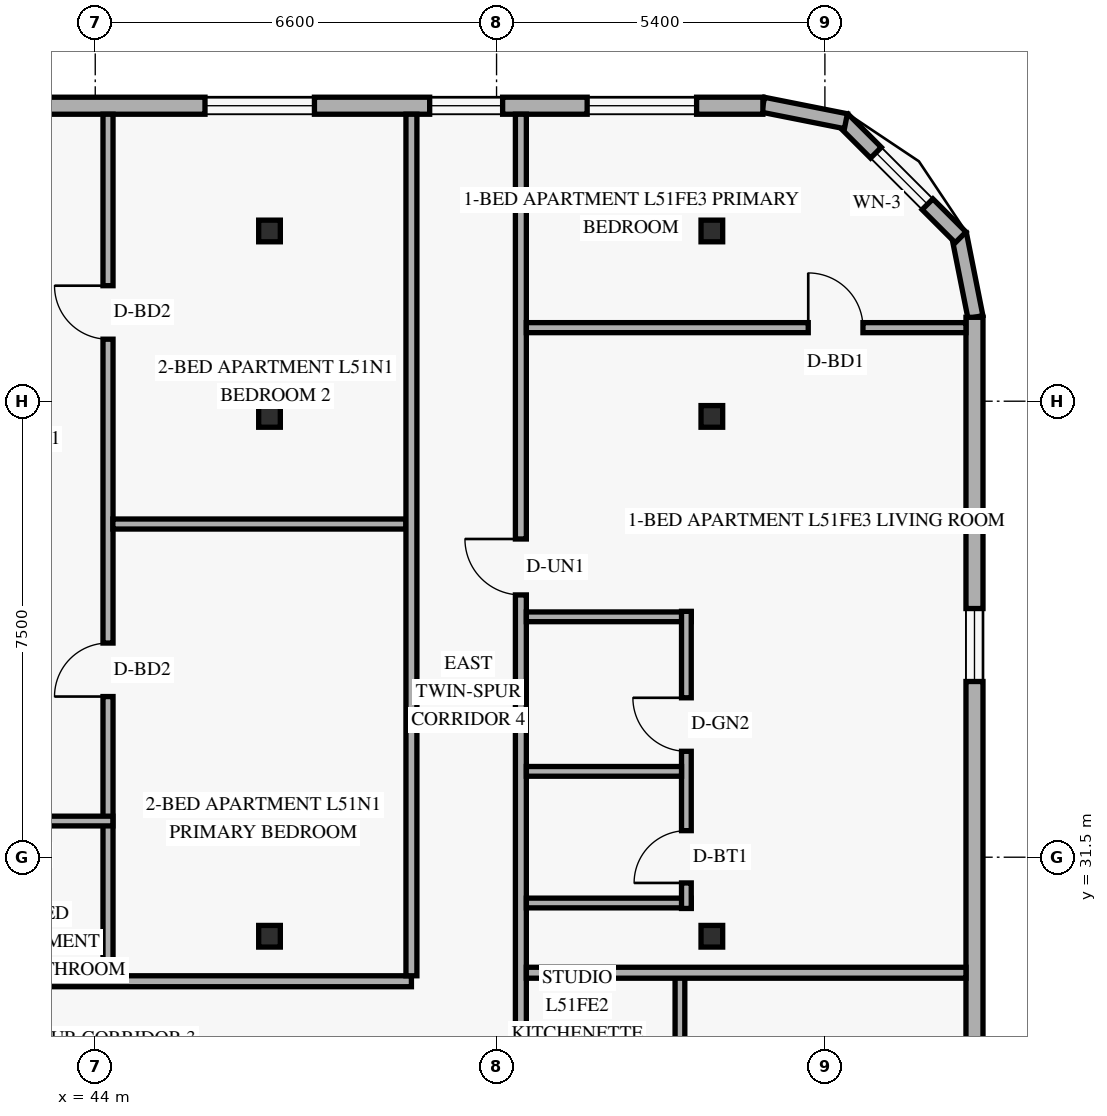
"""IFC4 building model, lengths in metres.
Left out: names, types, materials, properties, quantities, classifications, styles, units other than length and angle.
Written with IfcOpenShell. Run it as: python <this file> out.ifc"""

import sys

from ifc_helpers import new_model, si_unit, direction, frame, frame_2d, origin, origin_2d, place, context, subcontext, project, spatial, rectangle, hollow_rectangle, extrude, element, fill, save


model = new_model("IFC4")
c1 = context("Model", 3, precision=1e-05, world=origin(), true_north=direction((0.0, 1.0)))
c2 = subcontext(c1, "Body", "Model", "MODEL_VIEW")
j1 = project(units=[si_unit("LENGTHUNIT", "METRE"), si_unit("PLANEANGLEUNIT", "RADIAN")], contexts=[c1])
p1 = place(None, origin())
s1 = spatial("IfcSite", under=j1, at=p1, CompositionType="ELEMENT")
p2 = place(p1, origin())
s2 = spatial("IfcBuilding", under=s1, at=p2, CompositionType="ELEMENT")
p3 = place(p2, frame((0.0, 0.0, 196.2)))
s3 = spatial("IfcBuildingStorey", under=s2, at=p3, CompositionType="ELEMENT", Elevation=196.2)
for number, where, z_axis, x_axis in (
    (1, (46.803, 30.2, 0.0), (0.035, 0.0, 0.999), (0.0, 1.0, 0.0)),
    (2, (46.803, 38.75, 0.0), (0.035, 0.0, 0.999), (0.0, 1.0, 0.0)),
    (3, (46.803, 41.8, 0.0), (0.035, 0.0, 0.999), (0.0, 1.0, 0.0)),
):
    element("IfcColumn", number, at=place(p3, frame(where, z_axis=z_axis, x_axis=x_axis)), inside=s3, PredefinedType="COLUMN", context=c2, shape_type="SweptSolid", body=[
        extrude(hollow_rectangle(XDim=0.356, YDim=0.356, WallThickness=0.016, at=origin_2d()), origin(), (0.0, 0.0, 1.0), 3.602),
    ])
for number, where, z_axis, x_axis in (
    (4, (54.036, 30.2, 0.0), (0.058, 0.0, 0.998), (0.0, 1.0, 0.0)),
    (5, (54.036, 38.75, 0.0), (0.058, 0.0, 0.998), (0.0, 1.0, 0.0)),
    (6, (54.036, 41.8, 0.0), (0.058, 0.0, 0.998), (0.0, 1.0, 0.0)),
):
    element("IfcColumn", number, at=place(p3, frame(where, z_axis=z_axis, x_axis=x_axis)), inside=s3, PredefinedType="COLUMN", context=c2, shape_type="SweptSolid", body=[
        extrude(hollow_rectangle(XDim=0.356, YDim=0.356, WallThickness=0.016, at=origin_2d()), origin(), (0.0, 0.0, 1.0), 3.606),
    ])
p4 = place(p3, frame((58.476, 40.384, 0.0), z_axis=(0.0, 0.0, 1.0), x_axis=(-0.19496651342, 0.980809899341, 0.0)))
e7 = element("IfcWall", 7, at=p4, inside=s3, PredefinedType="SOLIDWALL", context=c2, shape_type="SweptSolid", body=[
    extrude(rectangle(XDim=1.389, YDim=0.25, at=frame_2d((0.694, 0.0))), origin(), (0.0, 0.0, 1.0), 3.3),
])
p5 = place(p3, frame((58.232, 41.695, 0.0), z_axis=(0.0, 0.0, 1.0), x_axis=(-0.707106781187, 0.707106781187, 0.0)))
e8 = element("IfcWall", 8, at=p5, inside=s3, PredefinedType="SOLIDWALL", context=c2, shape_type="SweptSolid", body=[
    extrude(rectangle(XDim=2.739, YDim=0.25, at=frame_2d((1.37, 0.0))), origin(), (0.0, 0.0, 1.0), 3.3),
])
p6 = place(p5, frame((0.77, 0.0, 0.85)))
e9 = element("IfcOpeningElement", 9, at=p6, cuts=e8, PredefinedType="OPENING", context=c2, shape_type="SweptSolid", body=[
    extrude(rectangle(XDim=1.2, YDim=1.5, at=frame_2d((0.6, 0.75))), frame((0.0, 0.135, 0.0), z_axis=(0.0, -1.0, 0.0), x_axis=(1.0, 0.0, 0.0)), (0.0, 0.0, 1.0), 0.27),
])
p7 = place(p3, frame((56.345, 43.605, 0.0), z_axis=(0.0, 0.0, 1.0), x_axis=(-0.980809899341, 0.19496651342, 0.0)))
e10 = element("IfcWall", 10, at=p7, inside=s3, PredefinedType="SOLIDWALL", context=c2, shape_type="SweptSolid", body=[
    extrude(rectangle(XDim=1.389, YDim=0.25, at=frame_2d((0.694, 0.0))), origin(), (0.0, 0.0, 1.0), 3.3),
])
p8 = place(p3, frame((58.46, 7.62, 0.0), z_axis=(0.0, 0.0, 1.0), x_axis=(0.0, 1.0, 0.0)))
e11 = element("IfcWall", 11, at=p8, inside=s3, PredefinedType="SOLIDWALL", context=c2, shape_type="SweptSolid", body=[
    extrude(rectangle(XDim=32.76, YDim=0.28, at=frame_2d((16.38, 0.0))), origin(), (0.0, 0.0, 1.0), 3.3),
])
p9 = place(p8, frame((3.79, 0.0, 0.85)))
e12 = element("IfcOpeningElement", 12, at=p9, cuts=e11, PredefinedType="OPENING", context=c2, shape_type="SweptSolid", body=[
    extrude(rectangle(XDim=1.2, YDim=1.5, at=frame_2d((0.6, 0.75))), frame((0.0, 0.15, 0.0), z_axis=(0.0, -1.0, 0.0), x_axis=(1.0, 0.0, 0.0)), (0.0, 0.0, 1.0), 0.3),
])
p10 = place(p8, frame((14.78, 0.0, 0.85)))
e13 = element("IfcOpeningElement", 13, at=p10, cuts=e11, PredefinedType="OPENING", context=c2, shape_type="SweptSolid", body=[
    extrude(rectangle(XDim=1.2, YDim=1.5, at=frame_2d((0.6, 0.75))), frame((0.0, 0.15, 0.0), z_axis=(0.0, -1.0, 0.0), x_axis=(1.0, 0.0, 0.0)), (0.0, 0.0, 1.0), 0.3),
])
p11 = place(p8, frame((26.77, 0.0, 0.85)))
e14 = element("IfcOpeningElement", 14, at=p11, cuts=e11, PredefinedType="OPENING", context=c2, shape_type="SweptSolid", body=[
    extrude(rectangle(XDim=1.2, YDim=1.5, at=frame_2d((0.6, 0.75))), frame((0.0, 0.15, 0.0), z_axis=(0.0, -1.0, 0.0), x_axis=(1.0, 0.0, 0.0)), (0.0, 0.0, 1.0), 0.3),
])
p12 = place(p3, frame((54.98, 43.86, 0.0), z_axis=(0.0, 0.0, 1.0), x_axis=(-1.0, 0.0, 0.0)))
e15 = element("IfcWall", 15, at=p12, inside=s3, PredefinedType="SOLIDWALL", context=c2, shape_type="SweptSolid", body=[
    extrude(rectangle(XDim=33.76, YDim=0.28, at=frame_2d((16.88, 0.0))), origin(), (0.0, 0.0, 1.0), 3.3),
])
p13 = place(p12, frame((28.055, 0.0, 0.85)))
e16 = element("IfcOpeningElement", 16, at=p13, cuts=e15, PredefinedType="OPENING", context=c2, shape_type="SweptSolid", body=[
    extrude(rectangle(XDim=1.8, YDim=1.6, at=frame_2d((0.9, 0.8))), frame((0.0, 0.15, 0.0), z_axis=(0.0, -1.0, 0.0), x_axis=(1.0, 0.0, 0.0)), (0.0, 0.0, 1.0), 0.3),
])
p14 = place(p12, frame((21.17, 0.0, 0.85)))
e17 = element("IfcOpeningElement", 17, at=p14, cuts=e15, PredefinedType="OPENING", context=c2, shape_type="SweptSolid", body=[
    extrude(rectangle(XDim=1.8, YDim=1.6, at=frame_2d((0.9, 0.8))), frame((0.0, 0.15, 0.0), z_axis=(0.0, -1.0, 0.0), x_axis=(1.0, 0.0, 0.0)), (0.0, 0.0, 1.0), 0.3),
])
p15 = place(p12, frame((17.165, 0.0, 0.85)))
e18 = element("IfcOpeningElement", 18, at=p15, cuts=e15, PredefinedType="OPENING", context=c2, shape_type="SweptSolid", body=[
    extrude(rectangle(XDim=1.8, YDim=1.6, at=frame_2d((0.9, 0.8))), frame((0.0, 0.15, 0.0), z_axis=(0.0, -1.0, 0.0), x_axis=(1.0, 0.0, 0.0)), (0.0, 0.0, 1.0), 0.3),
])
p16 = place(p12, frame((12.77, 0.0, 0.85)))
e19 = element("IfcOpeningElement", 19, at=p16, cuts=e15, PredefinedType="OPENING", context=c2, shape_type="SweptSolid", body=[
    extrude(rectangle(XDim=1.8, YDim=1.6, at=frame_2d((0.9, 0.8))), frame((0.0, 0.15, 0.0), z_axis=(0.0, -1.0, 0.0), x_axis=(1.0, 0.0, 0.0)), (0.0, 0.0, 1.0), 0.3),
])
p17 = place(p12, frame((7.375, 0.0, 0.85)))
e20 = element("IfcOpeningElement", 20, at=p17, cuts=e15, PredefinedType="OPENING", context=c2, shape_type="SweptSolid", body=[
    extrude(rectangle(XDim=1.8, YDim=1.6, at=frame_2d((0.9, 0.8))), frame((0.0, 0.15, 0.0), z_axis=(0.0, -1.0, 0.0), x_axis=(1.0, 0.0, 0.0)), (0.0, 0.0, 1.0), 0.3),
])
p18 = place(p12, frame((4.28, 0.0, 0.85)))
e21 = element("IfcOpeningElement", 21, at=p18, cuts=e15, PredefinedType="OPENING", context=c2, shape_type="SweptSolid", body=[
    extrude(rectangle(XDim=1.2, YDim=1.5, at=frame_2d((0.6, 0.75))), frame((0.0, 0.15, 0.0), z_axis=(0.0, -1.0, 0.0), x_axis=(1.0, 0.0, 0.0)), (0.0, 0.0, 1.0), 0.3),
])
p19 = place(p12, frame((1.09, 0.0, 0.85)))
e22 = element("IfcOpeningElement", 22, at=p19, cuts=e15, PredefinedType="OPENING", context=c2, shape_type="SweptSolid", body=[
    extrude(rectangle(XDim=1.8, YDim=1.6, at=frame_2d((0.9, 0.8))), frame((0.0, 0.15, 0.0), z_axis=(0.0, -1.0, 0.0), x_axis=(1.0, 0.0, 0.0)), (0.0, 0.0, 1.0), 0.3),
])
p20 = place(p3, frame((35.51, 29.46, 0.0), z_axis=(0.0, 0.0, 1.0), x_axis=(1.0, 0.0, 0.0)))
e23 = element("IfcWall", 23, at=p20, inside=s3, PredefinedType="STANDARD", context=c2, shape_type="SweptSolid", body=[
    extrude(rectangle(XDim=13.69, YDim=0.18, at=frame_2d((6.845, 0.0))), origin(), (0.0, 0.0, 1.0), 2.67),
])
p21 = place(p20, frame((0.32, 0.0, 0.0)))
e24 = element("IfcOpeningElement", 24, at=p21, cuts=e23, PredefinedType="OPENING", context=c2, shape_type="SweptSolid", body=[
    extrude(rectangle(XDim=0.92, YDim=2.15, at=frame_2d((0.46, 1.075))), frame((0.0, 0.1, 0.0), z_axis=(0.0, -1.0, 0.0), x_axis=(1.0, 0.0, 0.0)), (0.0, 0.0, 1.0), 0.2),
])
p22 = place(p3, frame((44.21, 29.55, 0.0), z_axis=(0.0, 0.0, 1.0), x_axis=(0.0, 1.0, 0.0)))
e25 = element("IfcWall", 25, at=p22, inside=s3, PredefinedType="PARTITIONING", context=c2, shape_type="SweptSolid", body=[
    extrude(rectangle(XDim=14.17, YDim=0.165, at=frame_2d((7.085, 0.0))), origin(), (0.0, 0.0, 1.0), 2.67),
])
p23 = place(p22, frame((4.593, 0.0, 0.0)))
e26 = element("IfcOpeningElement", 26, at=p23, cuts=e25, PredefinedType="OPENING", context=c2, shape_type="SweptSolid", body=[
    extrude(rectangle(XDim=0.88, YDim=2.14, at=frame_2d((0.44, 1.07))), frame((0.0, 0.093, 0.0), z_axis=(0.0, -1.0, 0.0), x_axis=(1.0, 0.0, 0.0)), (0.0, 0.0, 1.0), 0.185),
])
p24 = place(p22, frame((10.47, 0.0, 0.0)))
e27 = element("IfcOpeningElement", 27, at=p24, cuts=e25, PredefinedType="OPENING", context=c2, shape_type="SweptSolid", body=[
    extrude(rectangle(XDim=0.88, YDim=2.14, at=frame_2d((0.44, 1.07))), frame((0.0, 0.093, 0.0), z_axis=(0.0, -1.0, 0.0), x_axis=(1.0, 0.0, 0.0)), (0.0, 0.0, 1.0), 0.185),
])
p25 = place(p3, frame((39.58, 32.095, 0.0), z_axis=(0.0, 0.0, 1.0), x_axis=(1.0, 0.0, 0.0)))
e28 = element("IfcWall", 28, at=p25, inside=s3, PredefinedType="PLUMBINGWALL", context=c2, shape_type="SweptSolid", body=[
    extrude(rectangle(XDim=4.71, YDim=0.16, at=frame_2d((2.355, 0.0))), origin(), (0.0, 0.0, 1.0), 3.3),
])
p26 = place(p25, frame((0.38, 0.0, 0.0)))
e29 = element("IfcOpeningElement", 29, at=p26, cuts=e28, PredefinedType="OPENING", context=c2, shape_type="SweptSolid", body=[
    extrude(rectangle(XDim=0.88, YDim=2.12, at=frame_2d((0.44, 1.06))), frame((0.0, 0.09, 0.0), z_axis=(0.0, -1.0, 0.0), x_axis=(1.0, 0.0, 0.0)), (0.0, 0.0, 1.0), 0.18),
])
p27 = place(p25, frame((2.786, 0.0, 0.0)))
e30 = element("IfcOpeningElement", 30, at=p27, cuts=e28, PredefinedType="OPENING", context=c2, shape_type="SweptSolid", body=[
    extrude(rectangle(XDim=0.86, YDim=2.12, at=frame_2d((0.43, 1.06))), frame((0.0, 0.09, 0.0), z_axis=(0.0, -1.0, 0.0), x_axis=(1.0, 0.0, 0.0)), (0.0, 0.0, 1.0), 0.18),
])
p28 = place(p3, frame((44.29, 36.98, 0.0), z_axis=(0.0, 0.0, 1.0), x_axis=(1.0, 0.0, 0.0)))
e31 = element("IfcWall", 31, at=p28, inside=s3, PredefinedType="PARTITIONING", context=c2, shape_type="SweptSolid", body=[
    extrude(rectangle(XDim=4.82, YDim=0.165, at=frame_2d((2.41, 0.0))), origin(), (0.0, 0.0, 1.0), 2.67),
])
p29 = place(p3, frame((51.0, 4.28, 0.0), z_axis=(0.0, 0.0, 1.0), x_axis=(0.0, 1.0, 0.0)))
e32 = element("IfcWall", 32, at=p29, inside=s3, PredefinedType="STANDARD", context=c2, shape_type="SweptSolid", body=[
    extrude(rectangle(XDim=39.44, YDim=0.18, at=frame_2d((19.72, 0.0))), origin(), (0.0, 0.0, 1.0), 2.67),
])
p30 = place(p29, frame((6.08, 0.0, 0.0)))
e33 = element("IfcOpeningElement", 33, at=p30, cuts=e32, PredefinedType="OPENING", context=c2, shape_type="SweptSolid", body=[
    extrude(rectangle(XDim=0.92, YDim=2.15, at=frame_2d((0.46, 1.075))), frame((0.0, 0.1, 0.0), z_axis=(0.0, -1.0, 0.0), x_axis=(1.0, 0.0, 0.0)), (0.0, 0.0, 1.0), 0.2),
])
p31 = place(p29, frame((19.38, 0.0, 0.0)))
e34 = element("IfcOpeningElement", 34, at=p31, cuts=e32, PredefinedType="OPENING", context=c2, shape_type="SweptSolid", body=[
    extrude(rectangle(XDim=0.92, YDim=2.15, at=frame_2d((0.46, 1.075))), frame((0.0, 0.1, 0.0), z_axis=(0.0, -1.0, 0.0), x_axis=(1.0, 0.0, 0.0)), (0.0, 0.0, 1.0), 0.2),
])
p32 = place(p29, frame((31.534, 0.0, 0.0)))
e35 = element("IfcOpeningElement", 35, at=p32, cuts=e32, PredefinedType="OPENING", context=c2, shape_type="SweptSolid", body=[
    extrude(rectangle(XDim=0.92, YDim=2.15, at=frame_2d((0.46, 1.075))), frame((0.0, 0.1, 0.0), z_axis=(0.0, -1.0, 0.0), x_axis=(1.0, 0.0, 0.0)), (0.0, 0.0, 1.0), 0.2),
])
p33 = place(p3, frame((49.2, 29.55, 0.0), z_axis=(0.0, 0.0, 1.0), x_axis=(0.0, 1.0, 0.0)))
e36 = element("IfcWall", 36, at=p33, inside=s3, PredefinedType="STANDARD", context=c2, shape_type="SweptSolid", body=[
    extrude(rectangle(XDim=14.17, YDim=0.18, at=frame_2d((7.085, 0.0))), origin(), (0.0, 0.0, 1.0), 2.67),
])
p34 = place(p3, frame((53.616, 24.87, 0.0), z_axis=(0.0, 0.0, 1.0), x_axis=(0.0, 1.0, 0.0)))
e37 = element("IfcWall", 37, at=p34, inside=s3, PredefinedType="PLUMBINGWALL", context=c2, shape_type="SweptSolid", body=[
    extrude(rectangle(XDim=4.73, YDim=0.16, at=frame_2d((2.365, 0.0))), origin(), (0.0, 0.0, 1.0), 2.743),
])
p35 = place(p34, frame((0.42, 0.0, 0.0)))
e38 = element("IfcOpeningElement", 38, at=p35, cuts=e37, PredefinedType="OPENING", context=c2, shape_type="SweptSolid", body=[
    extrude(rectangle(XDim=0.86, YDim=2.12, at=frame_2d((0.43, 1.06))), frame((0.0, 0.09, 0.0), z_axis=(0.0, -1.0, 0.0), x_axis=(1.0, 0.0, 0.0)), (0.0, 0.0, 1.0), 0.18),
])
p36 = place(p34, frame((2.513, 0.0, 0.0)))
e39 = element("IfcOpeningElement", 39, at=p36, cuts=e37, PredefinedType="OPENING", context=c2, shape_type="SweptSolid", body=[
    extrude(rectangle(XDim=0.88, YDim=2.12, at=frame_2d((0.44, 1.06))), frame((0.0, 0.09, 0.0), z_axis=(0.0, -1.0, 0.0), x_axis=(1.0, 0.0, 0.0)), (0.0, 0.0, 1.0), 0.18),
])
p37 = place(p3, frame((51.09, 29.6, 0.0), z_axis=(0.0, 0.0, 1.0), x_axis=(1.0, 0.0, 0.0)))
e40 = element("IfcWall", 40, at=p37, inside=s3, PredefinedType="PARTITIONING", context=c2, shape_type="SweptSolid", body=[
    extrude(rectangle(XDim=7.23, YDim=0.18, at=frame_2d((3.615, 0.0))), origin(), (0.0, 0.0, 1.0), 2.743),
])
p38 = place(p3, frame((51.09, 40.21, 0.0), z_axis=(0.0, 0.0, 1.0), x_axis=(1.0, 0.0, 0.0)))
e41 = element("IfcWall", 41, at=p38, inside=s3, PredefinedType="PARTITIONING", context=c2, shape_type="SweptSolid", body=[
    extrude(rectangle(XDim=7.23, YDim=0.165, at=frame_2d((3.615, 0.0))), origin(), (0.0, 0.0, 1.0), 2.819),
])
p39 = place(p38, frame((4.636, 0.0, 0.0)))
e42 = element("IfcOpeningElement", 42, at=p39, cuts=e41, PredefinedType="OPENING", context=c2, shape_type="SweptSolid", body=[
    extrude(rectangle(XDim=0.9, YDim=2.14, at=frame_2d((0.45, 1.07))), frame((0.0, 0.093, 0.0), z_axis=(0.0, -1.0, 0.0), x_axis=(1.0, 0.0, 0.0)), (0.0, 0.0, 1.0), 0.185),
])
for number, where, z_axis, x_axis in (
    (43, (51.09, 30.747, 0.0), (0.0, 0.0, 1.0), (1.0, 0.0, 0.0)),
    (44, (51.09, 35.454, 0.0), (0.0, 0.0, 1.0), (1.0, 0.0, 0.0)),
):
    element("IfcWall", number, at=place(p3, frame(where, z_axis=z_axis, x_axis=x_axis)), inside=s3, PredefinedType="PLUMBINGWALL", context=c2, shape_type="SweptSolid", body=[
        extrude(rectangle(XDim=2.712, YDim=0.16, at=frame_2d((1.356, 0.0))), origin(), (0.0, 0.0, 1.0), 3.3),
    ])
p40 = place(p3, frame((53.722, 30.657, 0.0), z_axis=(0.0, 0.0, 1.0), x_axis=(0.0, 1.0, 0.0)))
e45 = element("IfcWall", 45, at=p40, inside=s3, PredefinedType="PLUMBINGWALL", context=c2, shape_type="SweptSolid", body=[
    extrude(rectangle(XDim=4.887, YDim=0.16, at=frame_2d((2.443, 0.0))), origin(), (0.0, 0.0, 1.0), 2.924),
])
p41 = place(p40, frame((0.42, 0.0, 0.0)))
e46 = element("IfcOpeningElement", 46, at=p41, cuts=e45, PredefinedType="OPENING", context=c2, shape_type="SweptSolid", body=[
    extrude(rectangle(XDim=0.86, YDim=2.12, at=frame_2d((0.43, 1.06))), frame((0.0, 0.09, 0.0), z_axis=(0.0, -1.0, 0.0), x_axis=(1.0, 0.0, 0.0)), (0.0, 0.0, 1.0), 0.18),
])
p42 = place(p40, frame((2.585, 0.0, 0.0)))
e47 = element("IfcOpeningElement", 47, at=p42, cuts=e45, PredefinedType="OPENING", context=c2, shape_type="SweptSolid", body=[
    extrude(rectangle(XDim=0.88, YDim=2.12, at=frame_2d((0.44, 1.06))), frame((0.0, 0.09, 0.0), z_axis=(0.0, -1.0, 0.0), x_axis=(1.0, 0.0, 0.0)), (0.0, 0.0, 1.0), 0.18),
])
p43 = place(p3, frame((51.09, 32.912, 0.0), z_axis=(0.0, 0.0, 1.0), x_axis=(1.0, 0.0, 0.0)))
e48 = element("IfcWall", 48, at=p43, inside=s3, PredefinedType="PLUMBINGWALL", context=c2, shape_type="SweptSolid", body=[
    extrude(rectangle(XDim=2.552, YDim=0.16, at=frame_2d((1.276, 0.0))), origin(), (0.0, 0.0, 1.0), 3.3),
])
p44 = place(p6, origin())
e49 = element("IfcWindow", 49, at=p44, inside=s3, PartitioningType="SINGLE_PANEL", PredefinedType="WINDOW", context=c2, shape_type="SweptSolid", body=[
    extrude(rectangle(XDim=1.2, YDim=1.5, at=frame_2d((0.6, 0.75))), frame((0.0, 0.03, 0.0), z_axis=(0.0, -1.0, 0.0), x_axis=(1.0, 0.0, 0.0)), (0.0, 0.0, 1.0), 0.06),
])
fill(e9, e49)
p45 = place(p11, origin())
e50 = element("IfcWindow", 50, at=p45, inside=s3, PartitioningType="SINGLE_PANEL", PredefinedType="WINDOW", context=c2, shape_type="SweptSolid", body=[
    extrude(rectangle(XDim=1.2, YDim=1.5, at=frame_2d((0.6, 0.75))), frame((0.0, 0.03, 0.0), z_axis=(0.0, -1.0, 0.0), x_axis=(1.0, 0.0, 0.0)), (0.0, 0.0, 1.0), 0.06),
])
fill(e14, e50)
p46 = place(p17, origin())
e51 = element("IfcWindow", 51, at=p46, inside=s3, PartitioningType="SINGLE_PANEL", PredefinedType="WINDOW", context=c2, shape_type="SweptSolid", body=[
    extrude(rectangle(XDim=1.8, YDim=1.6, at=frame_2d((0.9, 0.8))), frame((0.0, 0.03, 0.0), z_axis=(0.0, -1.0, 0.0), x_axis=(1.0, 0.0, 0.0)), (0.0, 0.0, 1.0), 0.06),
])
fill(e20, e51)
p47 = place(p18, origin())
e52 = element("IfcWindow", 52, at=p47, inside=s3, PartitioningType="SINGLE_PANEL", PredefinedType="WINDOW", context=c2, shape_type="SweptSolid", body=[
    extrude(rectangle(XDim=1.2, YDim=1.5, at=frame_2d((0.6, 0.75))), frame((0.0, 0.03, 0.0), z_axis=(0.0, -1.0, 0.0), x_axis=(1.0, 0.0, 0.0)), (0.0, 0.0, 1.0), 0.06),
])
fill(e21, e52)
p48 = place(p19, origin())
e53 = element("IfcWindow", 53, at=p48, inside=s3, PartitioningType="SINGLE_PANEL", PredefinedType="WINDOW", context=c2, shape_type="SweptSolid", body=[
    extrude(rectangle(XDim=1.8, YDim=1.6, at=frame_2d((0.9, 0.8))), frame((0.0, 0.03, 0.0), z_axis=(0.0, -1.0, 0.0), x_axis=(1.0, 0.0, 0.0)), (0.0, 0.0, 1.0), 0.06),
])
fill(e22, e53)
p49 = place(p23, origin())
e54 = element("IfcDoor", 54, at=p49, inside=s3, OperationType="SINGLE_SWING_LEFT", PredefinedType="DOOR", context=c2, shape_type="SweptSolid", body=[
    extrude(rectangle(XDim=0.88, YDim=2.14, at=frame_2d((0.44, 1.07))), frame((0.0, 0.025, 0.0), z_axis=(0.0, -1.0, 0.0), x_axis=(1.0, 0.0, 0.0)), (0.0, 0.0, 1.0), 0.05),
])
fill(e26, e54)
p50 = place(p24, origin())
e55 = element("IfcDoor", 55, at=p50, inside=s3, OperationType="SINGLE_SWING_RIGHT", PredefinedType="DOOR", context=c2, shape_type="SweptSolid", body=[
    extrude(rectangle(XDim=0.88, YDim=2.14, at=frame_2d((0.44, 1.07))), frame((0.0, 0.025, 0.0), z_axis=(0.0, -1.0, 0.0), x_axis=(1.0, 0.0, 0.0)), (0.0, 0.0, 1.0), 0.05),
])
fill(e27, e55)
p51 = place(p32, origin())
e56 = element("IfcDoor", 56, at=p51, inside=s3, OperationType="SINGLE_SWING_RIGHT", PredefinedType="DOOR", context=c2, shape_type="SweptSolid", body=[
    extrude(rectangle(XDim=0.92, YDim=2.15, at=frame_2d((0.46, 1.075))), frame((0.0, 0.025, 0.0), z_axis=(0.0, -1.0, 0.0), x_axis=(1.0, 0.0, 0.0)), (0.0, 0.0, 1.0), 0.05),
])
fill(e35, e56)
p52 = place(p41, origin())
e57 = element("IfcDoor", 57, at=p52, inside=s3, OperationType="SINGLE_SWING_LEFT", PredefinedType="DOOR", context=c2, shape_type="SweptSolid", body=[
    extrude(rectangle(XDim=0.86, YDim=2.12, at=frame_2d((0.43, 1.06))), frame((0.0, 0.025, 0.0), z_axis=(0.0, -1.0, 0.0), x_axis=(1.0, 0.0, 0.0)), (0.0, 0.0, 1.0), 0.05),
])
fill(e46, e57)
p53 = place(p42, origin())
e58 = element("IfcDoor", 58, at=p53, inside=s3, OperationType="SINGLE_SWING_RIGHT", PredefinedType="DOOR", context=c2, shape_type="SweptSolid", body=[
    extrude(rectangle(XDim=0.88, YDim=2.12, at=frame_2d((0.44, 1.06))), frame((0.0, 0.025, 0.0), z_axis=(0.0, -1.0, 0.0), x_axis=(1.0, 0.0, 0.0)), (0.0, 0.0, 1.0), 0.05),
])
fill(e47, e58)
p54 = place(p39, origin())
e59 = element("IfcDoor", 59, at=p54, inside=s3, OperationType="SINGLE_SWING_LEFT", PredefinedType="DOOR", context=c2, shape_type="SweptSolid", body=[
    extrude(rectangle(XDim=0.9, YDim=2.14, at=frame_2d((0.45, 1.07))), frame((0.0, 0.025, 0.0), z_axis=(0.0, -1.0, 0.0), x_axis=(1.0, 0.0, 0.0)), (0.0, 0.0, 1.0), 0.05),
])
fill(e42, e59)
save(model, sys.argv[1])
